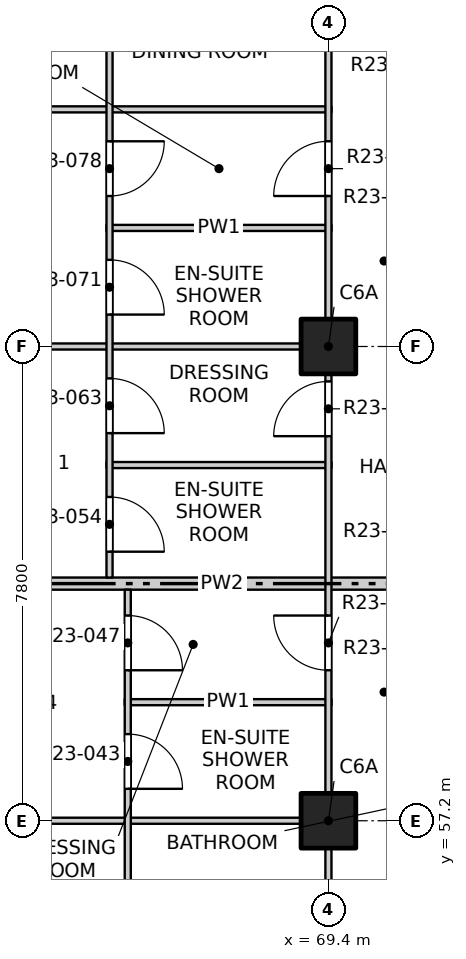
"""IFC4 building model, lengths in metres.
Left out: names, types, materials, properties, quantities, classifications, styles, units other than length and angle.
Written with IfcOpenShell. Run it as: python <this file> out.ifc"""

import sys

from ifc_helpers import new_model, si_unit, direction, frame, frame_2d, origin, origin_2d, place, context, subcontext, project, spatial, rectangle, extrude, element, fill, save


model = new_model("IFC4")
c1 = context("Model", 3, precision=1e-05, world=origin(), true_north=direction((0.0, 1.0)))
c2 = subcontext(c1, "Body", "Model", "MODEL_VIEW")
j1 = project(units=[si_unit("LENGTHUNIT", "METRE"), si_unit("PLANEANGLEUNIT", "RADIAN")], contexts=[c1])
p1 = place(None, origin())
s1 = spatial("IfcSite", under=j1, at=p1, CompositionType="ELEMENT")
p2 = place(p1, origin())
s2 = spatial("IfcBuilding", under=s1, at=p2, CompositionType="ELEMENT")
p3 = place(p2, frame((0.0, 0.0, 234.7)))
s3 = spatial("IfcBuildingStorey", under=s2, at=p3, CompositionType="ELEMENT", Elevation=234.7)
for number, where, z_axis, x_axis in (
    (1, (69.4, 57.2, -0.25), (0.0, 0.0, 1.0), (1.0, 0.0, 0.0)),
    (2, (69.4, 65.0, -0.25), (0.0, 0.0, 1.0), (1.0, 0.0, 0.0)),
):
    element("IfcColumn", number, at=place(p3, frame(where, z_axis=z_axis, x_axis=x_axis)), inside=s3, PredefinedType="COLUMN", context=c2, shape_type="SweptSolid", body=[
        extrude(rectangle(XDim=0.9, YDim=0.9, at=origin_2d()), origin(), (0.0, 0.0, 1.0), 3.4),
    ])
p4 = place(p3, frame((61.9, 57.2, 0.0), z_axis=(0.0, 0.0, 1.0), x_axis=(1.0, 0.0, 0.0)))
e3 = element("IfcWall", 3, at=p4, inside=s3, PredefinedType="PARTITIONING", context=c2, shape_type="SweptSolid", body=[
    extrude(rectangle(XDim=7.55, YDim=0.1, at=frame_2d((3.775, 0.0))), origin(), (0.0, 0.0, 1.0), 3.15),
])
p5 = place(p3, frame((66.05, 59.15, 0.0), z_axis=(0.0, 0.0, 1.0), x_axis=(1.0, 0.0, 0.0)))
e4 = element("IfcWall", 4, at=p5, inside=s3, PredefinedType="PARTITIONING", context=c2, shape_type="SweptSolid", body=[
    extrude(rectangle(XDim=3.4, YDim=0.1, at=frame_2d((1.7, 0.0))), origin(), (0.0, 0.0, 1.0), 3.15),
])
p6 = place(p3, frame((61.9, 61.1, 0.0), z_axis=(0.0, 0.0, 1.0), x_axis=(1.0, 0.0, 0.0)))
e5 = element("IfcWall", 5, at=p6, inside=s3, PredefinedType="PARTITIONING", context=c2, shape_type="SweptSolid", body=[
    extrude(rectangle(XDim=11.5, YDim=0.2, at=frame_2d((5.75, 0.0))), origin(), (0.0, 0.0, 1.0), 2.55),
])
p7 = place(p3, frame((65.75, 63.05, 0.0), z_axis=(0.0, 0.0, 1.0), x_axis=(1.0, 0.0, 0.0)))
e6 = element("IfcWall", 6, at=p7, inside=s3, PredefinedType="PARTITIONING", context=c2, shape_type="SweptSolid", body=[
    extrude(rectangle(XDim=3.7, YDim=0.1, at=frame_2d((1.85, 0.0))), origin(), (0.0, 0.0, 1.0), 3.15),
])
p8 = place(p3, frame((61.9, 65.0, 0.0), z_axis=(0.0, 0.0, 1.0), x_axis=(1.0, 0.0, 0.0)))
e7 = element("IfcWall", 7, at=p8, inside=s3, PredefinedType="PARTITIONING", context=c2, shape_type="SweptSolid", body=[
    extrude(rectangle(XDim=7.55, YDim=0.1, at=frame_2d((3.775, 0.0))), origin(), (0.0, 0.0, 1.0), 3.15),
])
p9 = place(p3, frame((65.75, 66.95, 0.0), z_axis=(0.0, 0.0, 1.0), x_axis=(1.0, 0.0, 0.0)))
e8 = element("IfcWall", 8, at=p9, inside=s3, PredefinedType="PARTITIONING", context=c2, shape_type="SweptSolid", body=[
    extrude(rectangle(XDim=3.7, YDim=0.1, at=frame_2d((1.85, 0.0))), origin(), (0.0, 0.0, 1.0), 3.15),
])
p10 = place(p3, frame((61.9, 68.9, 0.0), z_axis=(0.0, 0.0, 1.0), x_axis=(1.0, 0.0, 0.0)))
e9 = element("IfcWall", 9, at=p10, inside=s3, PredefinedType="PARTITIONING", context=c2, shape_type="SweptSolid", body=[
    extrude(rectangle(XDim=7.55, YDim=0.1, at=frame_2d((3.775, 0.0))), origin(), (0.0, 0.0, 1.0), 2.55),
])
p11 = place(p3, frame((65.8, 61.2, 0.0), z_axis=(0.0, 0.0, 1.0), x_axis=(0.0, 1.0, 0.0)))
e10 = element("IfcWall", 10, at=p11, inside=s3, PredefinedType="PARTITIONING", context=c2, shape_type="SweptSolid", body=[
    extrude(rectangle(XDim=15.4, YDim=0.1, at=frame_2d((7.7, 0.0))), origin(), (0.0, 0.0, 1.0), 3.15),
])
p12 = place(p11, frame((0.425, 0.0, 0.0)))
e11 = element("IfcOpeningElement", 11, at=p12, cuts=e10, PredefinedType="OPENING", context=c2, shape_type="SweptSolid", body=[
    extrude(rectangle(XDim=0.9, YDim=2.1, at=frame_2d((0.45, 1.05))), frame((0.0, 0.06, 0.0), z_axis=(0.0, -1.0, 0.0), x_axis=(1.0, 0.0, 0.0)), (0.0, 0.0, 1.0), 0.12),
])
p13 = place(p11, frame((2.375, 0.0, 0.0)))
e12 = element("IfcOpeningElement", 12, at=p13, cuts=e10, PredefinedType="OPENING", context=c2, shape_type="SweptSolid", body=[
    extrude(rectangle(XDim=0.9, YDim=2.1, at=frame_2d((0.45, 1.05))), frame((0.0, 0.06, 0.0), z_axis=(0.0, -1.0, 0.0), x_axis=(1.0, 0.0, 0.0)), (0.0, 0.0, 1.0), 0.12),
])
p14 = place(p11, frame((4.325, 0.0, 0.0)))
e13 = element("IfcOpeningElement", 13, at=p14, cuts=e10, PredefinedType="OPENING", context=c2, shape_type="SweptSolid", body=[
    extrude(rectangle(XDim=0.9, YDim=2.1, at=frame_2d((0.45, 1.05))), frame((0.0, 0.06, 0.0), z_axis=(0.0, -1.0, 0.0), x_axis=(1.0, 0.0, 0.0)), (0.0, 0.0, 1.0), 0.12),
])
p15 = place(p11, frame((6.275, 0.0, 0.0)))
e14 = element("IfcOpeningElement", 14, at=p15, cuts=e10, PredefinedType="OPENING", context=c2, shape_type="SweptSolid", body=[
    extrude(rectangle(XDim=0.9, YDim=2.1, at=frame_2d((0.45, 1.05))), frame((0.0, 0.06, 0.0), z_axis=(0.0, -1.0, 0.0), x_axis=(1.0, 0.0, 0.0)), (0.0, 0.0, 1.0), 0.12),
])
p16 = place(p11, frame((9.05, 0.0, 0.0)))
e15 = element("IfcOpeningElement", 15, at=p16, cuts=e10, PredefinedType="OPENING", context=c2, shape_type="SweptSolid", body=[
    extrude(rectangle(XDim=1.2, YDim=2.1, at=frame_2d((0.6, 1.05))), frame((0.0, 0.06, 0.0), z_axis=(0.0, -1.0, 0.0), x_axis=(1.0, 0.0, 0.0)), (0.0, 0.0, 1.0), 0.12),
])
p17 = place(p11, frame((12.95, 0.0, 0.0)))
e16 = element("IfcOpeningElement", 16, at=p17, cuts=e10, PredefinedType="OPENING", context=c2, shape_type="SweptSolid", body=[
    extrude(rectangle(XDim=1.2, YDim=2.1, at=frame_2d((0.6, 1.05))), frame((0.0, 0.06, 0.0), z_axis=(0.0, -1.0, 0.0), x_axis=(1.0, 0.0, 0.0)), (0.0, 0.0, 1.0), 0.12),
])
p18 = place(p3, frame((66.1, 41.9, 0.0), z_axis=(0.0, 0.0, 1.0), x_axis=(0.0, 1.0, 0.0)))
e17 = element("IfcWall", 17, at=p18, inside=s3, PredefinedType="PARTITIONING", context=c2, shape_type="SweptSolid", body=[
    extrude(rectangle(XDim=19.1, YDim=0.1, at=frame_2d((9.55, 0.0))), origin(), (0.0, 0.0, 1.0), 3.15),
])
p19 = place(p18, frame((1.05, 0.0, 0.0)))
e18 = element("IfcOpeningElement", 18, at=p19, cuts=e17, PredefinedType="OPENING", context=c2, shape_type="SweptSolid", body=[
    extrude(rectangle(XDim=1.2, YDim=2.1, at=frame_2d((0.6, 1.05))), frame((0.0, 0.06, 0.0), z_axis=(0.0, -1.0, 0.0), x_axis=(1.0, 0.0, 0.0)), (0.0, 0.0, 1.0), 0.12),
])
p20 = place(p18, frame((4.125, 0.0, 0.0)))
e19 = element("IfcOpeningElement", 19, at=p20, cuts=e17, PredefinedType="OPENING", context=c2, shape_type="SweptSolid", body=[
    extrude(rectangle(XDim=0.9, YDim=2.1, at=frame_2d((0.45, 1.05))), frame((0.0, 0.06, 0.0), z_axis=(0.0, -1.0, 0.0), x_axis=(1.0, 0.0, 0.0)), (0.0, 0.0, 1.0), 0.12),
])
p21 = place(p18, frame((6.075, 0.0, 0.0)))
e20 = element("IfcOpeningElement", 20, at=p21, cuts=e17, PredefinedType="OPENING", context=c2, shape_type="SweptSolid", body=[
    extrude(rectangle(XDim=0.9, YDim=2.1, at=frame_2d((0.45, 1.05))), frame((0.0, 0.06, 0.0), z_axis=(0.0, -1.0, 0.0), x_axis=(1.0, 0.0, 0.0)), (0.0, 0.0, 1.0), 0.12),
])
p22 = place(p18, frame((8.025, 0.0, 0.0)))
e21 = element("IfcOpeningElement", 21, at=p22, cuts=e17, PredefinedType="OPENING", context=c2, shape_type="SweptSolid", body=[
    extrude(rectangle(XDim=0.9, YDim=2.1, at=frame_2d((0.45, 1.05))), frame((0.0, 0.06, 0.0), z_axis=(0.0, -1.0, 0.0), x_axis=(1.0, 0.0, 0.0)), (0.0, 0.0, 1.0), 0.12),
])
p23 = place(p18, frame((9.975, 0.0, 0.0)))
e22 = element("IfcOpeningElement", 22, at=p23, cuts=e17, PredefinedType="OPENING", context=c2, shape_type="SweptSolid", body=[
    extrude(rectangle(XDim=0.9, YDim=2.1, at=frame_2d((0.45, 1.05))), frame((0.0, 0.06, 0.0), z_axis=(0.0, -1.0, 0.0), x_axis=(1.0, 0.0, 0.0)), (0.0, 0.0, 1.0), 0.12),
])
p24 = place(p18, frame((12.75, 0.0, 0.0)))
e23 = element("IfcOpeningElement", 23, at=p24, cuts=e17, PredefinedType="OPENING", context=c2, shape_type="SweptSolid", body=[
    extrude(rectangle(XDim=1.2, YDim=2.1, at=frame_2d((0.6, 1.05))), frame((0.0, 0.06, 0.0), z_axis=(0.0, -1.0, 0.0), x_axis=(1.0, 0.0, 0.0)), (0.0, 0.0, 1.0), 0.12),
])
p25 = place(p18, frame((15.825, 0.0, 0.0)))
e24 = element("IfcOpeningElement", 24, at=p25, cuts=e17, PredefinedType="OPENING", context=c2, shape_type="SweptSolid", body=[
    extrude(rectangle(XDim=0.9, YDim=2.1, at=frame_2d((0.45, 1.05))), frame((0.0, 0.06, 0.0), z_axis=(0.0, -1.0, 0.0), x_axis=(1.0, 0.0, 0.0)), (0.0, 0.0, 1.0), 0.12),
])
p26 = place(p18, frame((17.775, 0.0, 0.0)))
e25 = element("IfcOpeningElement", 25, at=p26, cuts=e17, PredefinedType="OPENING", context=c2, shape_type="SweptSolid", body=[
    extrude(rectangle(XDim=0.9, YDim=2.1, at=frame_2d((0.45, 1.05))), frame((0.0, 0.06, 0.0), z_axis=(0.0, -1.0, 0.0), x_axis=(1.0, 0.0, 0.0)), (0.0, 0.0, 1.0), 0.12),
])
p27 = place(p3, frame((69.4, 41.9, 0.0), z_axis=(0.0, 0.0, 1.0), x_axis=(0.0, 1.0, 0.0)))
e26 = element("IfcWall", 26, at=p27, inside=s3, PredefinedType="PARTITIONING", context=c2, shape_type="SweptSolid", body=[
    extrude(rectangle(XDim=46.2, YDim=0.1, at=frame_2d((23.1, 0.0))), origin(), (0.0, 0.0, 1.0), 3.15),
])
p28 = place(p27, frame((1.2, 0.0, 0.0)))
e27 = element("IfcOpeningElement", 27, at=p28, cuts=e26, PredefinedType="OPENING", context=c2, shape_type="SweptSolid", body=[
    extrude(rectangle(XDim=0.9, YDim=2.1, at=frame_2d((0.45, 1.05))), frame((0.0, 0.06, 0.0), z_axis=(0.0, -1.0, 0.0), x_axis=(1.0, 0.0, 0.0)), (0.0, 0.0, 1.0), 0.12),
])
p29 = place(p27, frame((6.025, 0.0, 0.0)))
e28 = element("IfcOpeningElement", 28, at=p29, cuts=e26, PredefinedType="OPENING", context=c2, shape_type="SweptSolid", body=[
    extrude(rectangle(XDim=0.9, YDim=2.1, at=frame_2d((0.45, 1.05))), frame((0.0, 0.06, 0.0), z_axis=(0.0, -1.0, 0.0), x_axis=(1.0, 0.0, 0.0)), (0.0, 0.0, 1.0), 0.12),
])
p30 = place(p27, frame((9.975, 0.0, 0.0)))
e29 = element("IfcOpeningElement", 29, at=p30, cuts=e26, PredefinedType="OPENING", context=c2, shape_type="SweptSolid", body=[
    extrude(rectangle(XDim=0.9, YDim=2.1, at=frame_2d((0.45, 1.05))), frame((0.0, 0.06, 0.0), z_axis=(0.0, -1.0, 0.0), x_axis=(1.0, 0.0, 0.0)), (0.0, 0.0, 1.0), 0.12),
])
p31 = place(p27, frame((12.9, 0.0, 0.0)))
e30 = element("IfcOpeningElement", 30, at=p31, cuts=e26, PredefinedType="OPENING", context=c2, shape_type="SweptSolid", body=[
    extrude(rectangle(XDim=0.9, YDim=2.1, at=frame_2d((0.45, 1.05))), frame((0.0, 0.06, 0.0), z_axis=(0.0, -1.0, 0.0), x_axis=(1.0, 0.0, 0.0)), (0.0, 0.0, 1.0), 0.12),
])
p32 = place(p27, frame((17.775, 0.0, 0.0)))
e31 = element("IfcOpeningElement", 31, at=p32, cuts=e26, PredefinedType="OPENING", context=c2, shape_type="SweptSolid", body=[
    extrude(rectangle(XDim=0.9, YDim=2.1, at=frame_2d((0.45, 1.05))), frame((0.0, 0.06, 0.0), z_axis=(0.0, -1.0, 0.0), x_axis=(1.0, 0.0, 0.0)), (0.0, 0.0, 1.0), 0.12),
])
p33 = place(p27, frame((21.625, 0.0, 0.0)))
e32 = element("IfcOpeningElement", 32, at=p33, cuts=e26, PredefinedType="OPENING", context=c2, shape_type="SweptSolid", body=[
    extrude(rectangle(XDim=0.9, YDim=2.1, at=frame_2d((0.45, 1.05))), frame((0.0, 0.06, 0.0), z_axis=(0.0, -1.0, 0.0), x_axis=(1.0, 0.0, 0.0)), (0.0, 0.0, 1.0), 0.12),
])
p34 = place(p27, frame((25.575, 0.0, 0.0)))
e33 = element("IfcOpeningElement", 33, at=p34, cuts=e26, PredefinedType="OPENING", context=c2, shape_type="SweptSolid", body=[
    extrude(rectangle(XDim=0.9, YDim=2.1, at=frame_2d((0.45, 1.05))), frame((0.0, 0.06, 0.0), z_axis=(0.0, -1.0, 0.0), x_axis=(1.0, 0.0, 0.0)), (0.0, 0.0, 1.0), 0.12),
])
p35 = place(p27, frame((28.5, 0.0, 0.0)))
e34 = element("IfcOpeningElement", 34, at=p35, cuts=e26, PredefinedType="OPENING", context=c2, shape_type="SweptSolid", body=[
    extrude(rectangle(XDim=0.9, YDim=2.1, at=frame_2d((0.45, 1.05))), frame((0.0, 0.06, 0.0), z_axis=(0.0, -1.0, 0.0), x_axis=(1.0, 0.0, 0.0)), (0.0, 0.0, 1.0), 0.12),
])
p36 = place(p27, frame((32.4, 0.0, 0.0)))
e35 = element("IfcOpeningElement", 35, at=p36, cuts=e26, PredefinedType="OPENING", context=c2, shape_type="SweptSolid", body=[
    extrude(rectangle(XDim=0.9, YDim=2.1, at=frame_2d((0.45, 1.05))), frame((0.0, 0.06, 0.0), z_axis=(0.0, -1.0, 0.0), x_axis=(1.0, 0.0, 0.0)), (0.0, 0.0, 1.0), 0.12),
])
p37 = place(p27, frame((36.3, 0.0, 0.0)))
e36 = element("IfcOpeningElement", 36, at=p37, cuts=e26, PredefinedType="OPENING", context=c2, shape_type="SweptSolid", body=[
    extrude(rectangle(XDim=0.9, YDim=2.1, at=frame_2d((0.45, 1.05))), frame((0.0, 0.06, 0.0), z_axis=(0.0, -1.0, 0.0), x_axis=(1.0, 0.0, 0.0)), (0.0, 0.0, 1.0), 0.12),
])
p38 = place(p27, frame((40.2, 0.0, 0.0)))
e37 = element("IfcOpeningElement", 37, at=p38, cuts=e26, PredefinedType="OPENING", context=c2, shape_type="SweptSolid", body=[
    extrude(rectangle(XDim=0.9, YDim=2.1, at=frame_2d((0.45, 1.05))), frame((0.0, 0.06, 0.0), z_axis=(0.0, -1.0, 0.0), x_axis=(1.0, 0.0, 0.0)), (0.0, 0.0, 1.0), 0.12),
])
p39 = place(p27, frame((44.1, 0.0, 0.0)))
e38 = element("IfcOpeningElement", 38, at=p39, cuts=e26, PredefinedType="OPENING", context=c2, shape_type="SweptSolid", body=[
    extrude(rectangle(XDim=0.9, YDim=2.1, at=frame_2d((0.45, 1.05))), frame((0.0, 0.06, 0.0), z_axis=(0.0, -1.0, 0.0), x_axis=(1.0, 0.0, 0.0)), (0.0, 0.0, 1.0), 0.12),
])
p40 = place(p25, origin())
e39 = element("IfcDoor", 39, at=p40, inside=s3, OperationType="SINGLE_SWING_RIGHT", PredefinedType="DOOR", context=c2, shape_type="SweptSolid", body=[
    extrude(rectangle(XDim=0.9, YDim=2.1, at=frame_2d((0.45, 1.05))), frame((0.0, 0.025, 0.0), z_axis=(0.0, -1.0, 0.0), x_axis=(1.0, 0.0, 0.0)), (0.0, 0.0, 1.0), 0.05),
])
fill(e24, e39)
p41 = place(p26, origin())
e40 = element("IfcDoor", 40, at=p41, inside=s3, OperationType="SINGLE_SWING_RIGHT", PredefinedType="DOOR", context=c2, shape_type="SweptSolid", body=[
    extrude(rectangle(XDim=0.9, YDim=2.1, at=frame_2d((0.45, 1.05))), frame((0.0, 0.025, 0.0), z_axis=(0.0, -1.0, 0.0), x_axis=(1.0, 0.0, 0.0)), (0.0, 0.0, 1.0), 0.05),
])
fill(e25, e40)
p42 = place(p32, origin())
e41 = element("IfcDoor", 41, at=p42, inside=s3, OperationType="SINGLE_SWING_RIGHT", PredefinedType="DOOR", context=c2, shape_type="SweptSolid", body=[
    extrude(rectangle(XDim=0.9, YDim=2.1, at=frame_2d((0.45, 1.05))), frame((0.0, 0.025, 0.0), z_axis=(0.0, -1.0, 0.0), x_axis=(1.0, 0.0, 0.0)), (0.0, 0.0, 1.0), 0.05),
])
fill(e31, e41)
p43 = place(p12, origin())
e42 = element("IfcDoor", 42, at=p43, inside=s3, OperationType="SINGLE_SWING_RIGHT", PredefinedType="DOOR", context=c2, shape_type="SweptSolid", body=[
    extrude(rectangle(XDim=0.9, YDim=2.1, at=frame_2d((0.45, 1.05))), frame((0.0, 0.025, 0.0), z_axis=(0.0, -1.0, 0.0), x_axis=(1.0, 0.0, 0.0)), (0.0, 0.0, 1.0), 0.05),
])
fill(e11, e42)
p44 = place(p33, origin())
e43 = element("IfcDoor", 43, at=p44, inside=s3, OperationType="SINGLE_SWING_LEFT", PredefinedType="DOOR", context=c2, shape_type="SweptSolid", body=[
    extrude(rectangle(XDim=0.9, YDim=2.1, at=frame_2d((0.45, 1.05))), frame((0.0, 0.025, 0.0), z_axis=(0.0, -1.0, 0.0), x_axis=(1.0, 0.0, 0.0)), (0.0, 0.0, 1.0), 0.05),
])
fill(e32, e43)
p45 = place(p13, origin())
e44 = element("IfcDoor", 44, at=p45, inside=s3, OperationType="SINGLE_SWING_RIGHT", PredefinedType="DOOR", context=c2, shape_type="SweptSolid", body=[
    extrude(rectangle(XDim=0.9, YDim=2.1, at=frame_2d((0.45, 1.05))), frame((0.0, 0.025, 0.0), z_axis=(0.0, -1.0, 0.0), x_axis=(1.0, 0.0, 0.0)), (0.0, 0.0, 1.0), 0.05),
])
fill(e12, e44)
p46 = place(p14, origin())
e45 = element("IfcDoor", 45, at=p46, inside=s3, OperationType="SINGLE_SWING_RIGHT", PredefinedType="DOOR", context=c2, shape_type="SweptSolid", body=[
    extrude(rectangle(XDim=0.9, YDim=2.1, at=frame_2d((0.45, 1.05))), frame((0.0, 0.025, 0.0), z_axis=(0.0, -1.0, 0.0), x_axis=(1.0, 0.0, 0.0)), (0.0, 0.0, 1.0), 0.05),
])
fill(e13, e45)
p47 = place(p15, origin())
e46 = element("IfcDoor", 46, at=p47, inside=s3, OperationType="SINGLE_SWING_LEFT", PredefinedType="DOOR", context=c2, shape_type="SweptSolid", body=[
    extrude(rectangle(XDim=0.9, YDim=2.1, at=frame_2d((0.45, 1.05))), frame((0.0, 0.025, 0.0), z_axis=(0.0, -1.0, 0.0), x_axis=(1.0, 0.0, 0.0)), (0.0, 0.0, 1.0), 0.05),
])
fill(e14, e46)
p48 = place(p34, origin())
e47 = element("IfcDoor", 47, at=p48, inside=s3, OperationType="SINGLE_SWING_LEFT", PredefinedType="DOOR", context=c2, shape_type="SweptSolid", body=[
    extrude(rectangle(XDim=0.9, YDim=2.1, at=frame_2d((0.45, 1.05))), frame((0.0, 0.025, 0.0), z_axis=(0.0, -1.0, 0.0), x_axis=(1.0, 0.0, 0.0)), (0.0, 0.0, 1.0), 0.05),
])
fill(e33, e47)
save(model, sys.argv[1])
